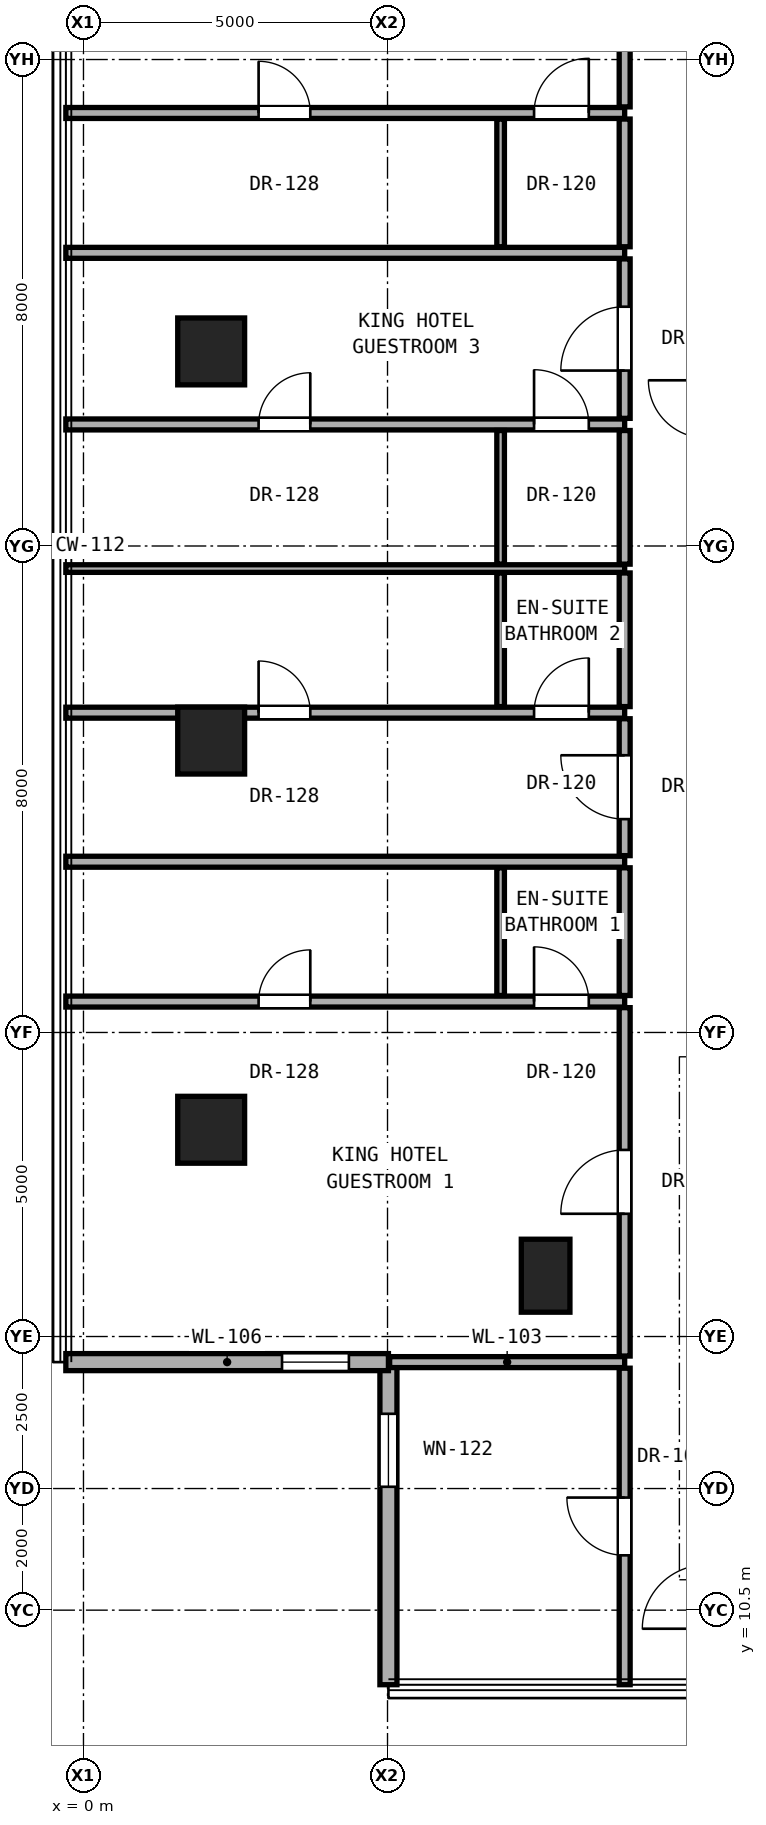
"""IFC4 building model, lengths in metres.
Left out: names, types, materials, properties, quantities, classifications, styles, units other than length and angle.
Written with IfcOpenShell. Run it as: python <this file> out.ifc"""

import sys

from ifc_helpers import new_model, si_unit, direction, frame, frame_2d, origin, origin_2d, place, context, subcontext, project, spatial, rectangle, hollow_rectangle, extrude, element, fill, save


model = new_model("IFC4")
c1 = context("Model", 3, precision=1e-05, world=origin(), true_north=direction((0.0, 1.0)))
c2 = subcontext(c1, "Body", "Model", "MODEL_VIEW")
j1 = project(units=[si_unit("LENGTHUNIT", "METRE"), si_unit("PLANEANGLEUNIT", "RADIAN")], contexts=[c1])
p1 = place(None, origin())
s1 = spatial("IfcSite", under=j1, at=p1, CompositionType="ELEMENT")
p2 = place(p1, origin())
s2 = spatial("IfcBuilding", under=s1, at=p2, CompositionType="ELEMENT")
p3 = place(p2, frame((0.0, 0.0, 95.0)))
s3 = spatial("IfcBuildingStorey", under=s2, at=p3, CompositionType="ELEMENT", Elevation=95.0)
for number, where, z_axis, x_axis in (
    (1, (2.1, 18.4, 0.0), (0.0, 0.0, 1.0), (1.0, 0.0, 0.0)),
    (2, (2.1, 24.8, 0.0), (0.0, 0.0, 1.0), (1.0, 0.0, 0.0)),
    (3, (2.1, 31.2, 0.0), (0.0, 0.0, 1.0), (1.0, 0.0, 0.0)),
):
    element("IfcColumn", number, at=place(p3, frame(where, z_axis=z_axis, x_axis=x_axis)), inside=s3, PredefinedType="COLUMN", context=c2, shape_type="SweptSolid", body=[
        extrude(hollow_rectangle(XDim=1.1, YDim=1.1, WallThickness=0.06, at=origin_2d()), origin(), (0.0, 0.0, 1.0), 3.3),
    ])
p4 = place(p3, frame((7.6, 16.0, 0.0), z_axis=(0.0, 0.0, 1.0), x_axis=(1.0, 0.0, 0.0)))
e4 = element("IfcColumn", 4, at=p4, inside=s3, PredefinedType="PILASTER", context=c2, shape_type="SweptSolid", body=[
    extrude(rectangle(XDim=0.8, YDim=1.2, at=origin_2d()), origin(), (0.0, 0.0, 1.0), 3.3),
])
p5 = place(p3, frame((5.015, 14.579, 0.0), z_axis=(0.0, 0.0, 1.0), x_axis=(0.0, -1.0, 0.0)))
e5 = element("IfcWall", 5, at=p5, inside=s3, PredefinedType="SOLIDWALL", context=c2, shape_type="SweptSolid", body=[
    extrude(rectangle(XDim=5.305, YDim=0.28, at=frame_2d((2.653, 0.0))), origin(), (0.0, 0.0, 1.0), 3.06),
])
p6 = place(p5, frame((0.85, 0.0, 0.81)))
e6 = element("IfcOpeningElement", 6, at=p6, cuts=e5, PredefinedType="OPENING", context=c2, shape_type="SweptSolid", body=[
    extrude(rectangle(XDim=1.2, YDim=2.1, at=frame_2d((0.6, 1.05))), frame((0.0, 0.15, 0.0), z_axis=(0.0, -1.0, 0.0), x_axis=(1.0, 0.0, 0.0)), (0.0, 0.0, 1.0), 0.3),
])
p7 = place(p3, frame((-0.29, 14.579, 0.0), z_axis=(0.0, 0.0, 1.0), x_axis=(1.0, 0.0, 0.0)))
e7 = element("IfcWall", 7, at=p7, inside=s3, PredefinedType="SOLIDWALL", context=c2, shape_type="SweptSolid", body=[
    extrude(rectangle(XDim=5.305, YDim=0.28, at=frame_2d((2.652, 0.0))), origin(), (0.0, 0.0, 1.0), 3.06),
])
p8 = place(p7, frame((3.555, 0.0, 0.85)))
e8 = element("IfcOpeningElement", 8, at=p8, cuts=e7, PredefinedType="OPENING", context=c2, shape_type="SweptSolid", body=[
    extrude(rectangle(XDim=1.1, YDim=2.0, at=frame_2d((0.55, 1.0))), frame((0.0, 0.15, 0.0), z_axis=(0.0, -1.0, 0.0), x_axis=(1.0, 0.0, 0.0)), (0.0, 0.0, 1.0), 0.3),
])
p9 = place(p3, frame((5.035, 14.579, 0.0), z_axis=(0.0, 0.0, 1.0), x_axis=(1.0, 0.0, 0.0)))
e9 = element("IfcWall", 9, at=p9, inside=s3, PredefinedType="PARTITIONING", context=c2, shape_type="SweptSolid", body=[
    extrude(rectangle(XDim=3.865, YDim=0.18, at=frame_2d((1.933, 0.0))), origin(), (0.0, 0.0, 1.0), 3.08),
])
p10 = place(p3, frame((-0.29, 20.508, 0.0), z_axis=(0.0, 0.0, 1.0), x_axis=(1.0, 0.0, 0.0)))
e10 = element("IfcWall", 10, at=p10, inside=s3, PredefinedType="PARTITIONING", context=c2, shape_type="SweptSolid", body=[
    extrude(rectangle(XDim=9.19, YDim=0.18, at=frame_2d((4.595, 0.0))), origin(), (0.0, 0.0, 1.0), 2.145),
])
p11 = place(p10, frame((3.17, 0.0, 0.0)))
e11 = element("IfcOpeningElement", 11, at=p11, cuts=e10, PredefinedType="OPENING", context=c2, shape_type="SweptSolid", body=[
    extrude(rectangle(XDim=0.85, YDim=2.01, at=frame_2d((0.425, 1.005))), frame((0.0, 0.1, 0.0), z_axis=(0.0, -1.0, 0.0), x_axis=(1.0, 0.0, 0.0)), (0.0, 0.0, 1.0), 0.2),
])
p12 = place(p10, frame((7.7, 0.0, 0.0)))
e12 = element("IfcOpeningElement", 12, at=p12, cuts=e10, PredefinedType="OPENING", context=c2, shape_type="SweptSolid", body=[
    extrude(rectangle(XDim=0.9, YDim=2.1, at=frame_2d((0.45, 1.05))), frame((0.0, 0.1, 0.0), z_axis=(0.0, -1.0, 0.0), x_axis=(1.0, 0.0, 0.0)), (0.0, 0.0, 1.0), 0.2),
])
p13 = place(p3, frame((-0.29, 22.808, 0.0), z_axis=(0.0, 0.0, 1.0), x_axis=(1.0, 0.0, 0.0)))
e13 = element("IfcWall", 13, at=p13, inside=s3, PredefinedType="PARTITIONING", context=c2, shape_type="SweptSolid", body=[
    extrude(rectangle(XDim=9.19, YDim=0.18, at=frame_2d((4.595, 0.0))), origin(), (0.0, 0.0, 1.0), 2.145),
])
p14 = place(p3, frame((-0.29, 25.259, 0.0), z_axis=(0.0, 0.0, 1.0), x_axis=(1.0, 0.0, 0.0)))
e14 = element("IfcWall", 14, at=p14, inside=s3, PredefinedType="PARTITIONING", context=c2, shape_type="SweptSolid", body=[
    extrude(rectangle(XDim=9.19, YDim=0.18, at=frame_2d((4.595, 0.0))), origin(), (0.0, 0.0, 1.0), 2.145),
])
p15 = place(p14, frame((3.17, 0.0, 0.0)))
e15 = element("IfcOpeningElement", 15, at=p15, cuts=e14, PredefinedType="OPENING", context=c2, shape_type="SweptSolid", body=[
    extrude(rectangle(XDim=0.85, YDim=2.01, at=frame_2d((0.425, 1.005))), frame((0.0, 0.1, 0.0), z_axis=(0.0, -1.0, 0.0), x_axis=(1.0, 0.0, 0.0)), (0.0, 0.0, 1.0), 0.2),
])
p16 = place(p14, frame((7.7, 0.0, 0.0)))
e16 = element("IfcOpeningElement", 16, at=p16, cuts=e14, PredefinedType="OPENING", context=c2, shape_type="SweptSolid", body=[
    extrude(rectangle(XDim=0.9, YDim=2.1, at=frame_2d((0.45, 1.05))), frame((0.0, 0.1, 0.0), z_axis=(0.0, -1.0, 0.0), x_axis=(1.0, 0.0, 0.0)), (0.0, 0.0, 1.0), 0.2),
])
p17 = place(p3, frame((-0.29, 27.629, 0.0), z_axis=(0.0, 0.0, 1.0), x_axis=(1.0, 0.0, 0.0)))
e17 = element("IfcWall", 17, at=p17, inside=s3, PredefinedType="PARTITIONING", context=c2, shape_type="SweptSolid", body=[
    extrude(rectangle(XDim=9.19, YDim=0.125, at=frame_2d((4.595, 0.0))), origin(), (0.0, 0.0, 1.0), 2.145),
])
p18 = place(p3, frame((-0.29, 29.999, 0.0), z_axis=(0.0, 0.0, 1.0), x_axis=(1.0, 0.0, 0.0)))
e18 = element("IfcWall", 18, at=p18, inside=s3, PredefinedType="PARTITIONING", context=c2, shape_type="SweptSolid", body=[
    extrude(rectangle(XDim=9.19, YDim=0.18, at=frame_2d((4.595, 0.0))), origin(), (0.0, 0.0, 1.0), 2.145),
])
p19 = place(p18, frame((3.17, 0.0, 0.0)))
e19 = element("IfcOpeningElement", 19, at=p19, cuts=e18, PredefinedType="OPENING", context=c2, shape_type="SweptSolid", body=[
    extrude(rectangle(XDim=0.85, YDim=2.01, at=frame_2d((0.425, 1.005))), frame((0.0, 0.1, 0.0), z_axis=(0.0, -1.0, 0.0), x_axis=(1.0, 0.0, 0.0)), (0.0, 0.0, 1.0), 0.2),
])
p20 = place(p18, frame((7.7, 0.0, 0.0)))
e20 = element("IfcOpeningElement", 20, at=p20, cuts=e18, PredefinedType="OPENING", context=c2, shape_type="SweptSolid", body=[
    extrude(rectangle(XDim=0.9, YDim=2.1, at=frame_2d((0.45, 1.05))), frame((0.0, 0.1, 0.0), z_axis=(0.0, -1.0, 0.0), x_axis=(1.0, 0.0, 0.0)), (0.0, 0.0, 1.0), 0.2),
])
p21 = place(p3, frame((-0.29, 32.821, 0.0), z_axis=(0.0, 0.0, 1.0), x_axis=(1.0, 0.0, 0.0)))
e21 = element("IfcWall", 21, at=p21, inside=s3, PredefinedType="PARTITIONING", context=c2, shape_type="SweptSolid", body=[
    extrude(rectangle(XDim=9.19, YDim=0.18, at=frame_2d((4.595, 0.0))), origin(), (0.0, 0.0, 1.0), 2.145),
])
p22 = place(p3, frame((-0.29, 35.121, 0.0), z_axis=(0.0, 0.0, 1.0), x_axis=(1.0, 0.0, 0.0)))
e22 = element("IfcWall", 22, at=p22, inside=s3, PredefinedType="PARTITIONING", context=c2, shape_type="SweptSolid", body=[
    extrude(rectangle(XDim=9.19, YDim=0.18, at=frame_2d((4.595, 0.0))), origin(), (0.0, 0.0, 1.0), 2.145),
])
p23 = place(p22, frame((3.17, 0.0, 0.0)))
e23 = element("IfcOpeningElement", 23, at=p23, cuts=e22, PredefinedType="OPENING", context=c2, shape_type="SweptSolid", body=[
    extrude(rectangle(XDim=0.85, YDim=2.01, at=frame_2d((0.425, 1.005))), frame((0.0, 0.1, 0.0), z_axis=(0.0, -1.0, 0.0), x_axis=(1.0, 0.0, 0.0)), (0.0, 0.0, 1.0), 0.2),
])
p24 = place(p22, frame((7.7, 0.0, 0.0)))
e24 = element("IfcOpeningElement", 24, at=p24, cuts=e22, PredefinedType="OPENING", context=c2, shape_type="SweptSolid", body=[
    extrude(rectangle(XDim=0.9, YDim=2.1, at=frame_2d((0.45, 1.05))), frame((0.0, 0.1, 0.0), z_axis=(0.0, -1.0, 0.0), x_axis=(1.0, 0.0, 0.0)), (0.0, 0.0, 1.0), 0.2),
])
p25 = place(p3, frame((6.86, 20.608, 0.0), z_axis=(0.0, 0.0, 1.0), x_axis=(0.0, 1.0, 0.0)))
e25 = element("IfcWall", 25, at=p25, inside=s3, PredefinedType="PARTITIONING", context=c2, shape_type="SweptSolid", body=[
    extrude(rectangle(XDim=2.1, YDim=0.125, at=frame_2d((1.05, 0.0))), origin(), (0.0, 0.0, 1.0), 3.08),
])
for number, where, z_axis, x_axis in (
    (26, (6.86, 25.359, 0.0), (0.0, 0.0, 1.0), (0.0, 1.0, 0.0)),
    (27, (6.86, 27.701, 0.0), (0.0, 0.0, 1.0), (0.0, 1.0, 0.0)),
):
    element("IfcWall", number, at=place(p3, frame(where, z_axis=z_axis, x_axis=x_axis)), inside=s3, PredefinedType="PARTITIONING", context=c2, shape_type="SweptSolid", body=[
        extrude(rectangle(XDim=2.198, YDim=0.125, at=frame_2d((1.099, 0.0))), origin(), (0.0, 0.0, 1.0), 3.08),
    ])
p26 = place(p3, frame((6.86, 32.921, 0.0), z_axis=(0.0, 0.0, 1.0), x_axis=(0.0, 1.0, 0.0)))
e28 = element("IfcWall", 28, at=p26, inside=s3, PredefinedType="PARTITIONING", context=c2, shape_type="SweptSolid", body=[
    extrude(rectangle(XDim=2.1, YDim=0.125, at=frame_2d((1.05, 0.0))), origin(), (0.0, 0.0, 1.0), 3.08),
])
p27 = place(p3, frame((8.9, 9.274, 0.0), z_axis=(0.0, 0.0, 1.0), x_axis=(0.0, 1.0, 0.0)))
e29 = element("IfcWall", 29, at=p27, inside=s3, PredefinedType="PARTITIONING", context=c2, shape_type="SweptSolid", body=[
    extrude(rectangle(XDim=5.205, YDim=0.18, at=frame_2d((2.603, 0.0))), origin(), (0.0, 0.0, 1.0), 3.08),
])
p28 = place(p27, frame((2.127, 0.0, 0.0)))
e30 = element("IfcOpeningElement", 30, at=p28, cuts=e29, PredefinedType="OPENING", context=c2, shape_type="SweptSolid", body=[
    extrude(rectangle(XDim=0.95, YDim=2.15, at=frame_2d((0.475, 1.075))), frame((0.0, 0.1, 0.0), z_axis=(0.0, -1.0, 0.0), x_axis=(1.0, 0.0, 0.0)), (0.0, 0.0, 1.0), 0.2),
])
p29 = place(p3, frame((8.9, 14.679, 0.0), z_axis=(0.0, 0.0, 1.0), x_axis=(0.0, 1.0, 0.0)))
e31 = element("IfcWall", 31, at=p29, inside=s3, PredefinedType="PARTITIONING", context=c2, shape_type="SweptSolid", body=[
    extrude(rectangle(XDim=5.729, YDim=0.18, at=frame_2d((2.865, 0.0))), origin(), (0.0, 0.0, 1.0), 2.456),
])
p30 = place(p29, frame((2.34, 0.0, 0.0)))
e32 = element("IfcOpeningElement", 32, at=p30, cuts=e31, PredefinedType="OPENING", context=c2, shape_type="SweptSolid", body=[
    extrude(rectangle(XDim=1.05, YDim=2.2, at=frame_2d((0.525, 1.1))), frame((0.0, 0.1, 0.0), z_axis=(0.0, -1.0, 0.0), x_axis=(1.0, 0.0, 0.0)), (0.0, 0.0, 1.0), 0.2),
])
p31 = place(p3, frame((8.9, 20.608, 0.0), z_axis=(0.0, 0.0, 1.0), x_axis=(0.0, 1.0, 0.0)))
e33 = element("IfcWall", 33, at=p31, inside=s3, PredefinedType="PARTITIONING", context=c2, shape_type="SweptSolid", body=[
    extrude(rectangle(XDim=2.1, YDim=0.18, at=frame_2d((1.05, 0.0))), origin(), (0.0, 0.0, 1.0), 3.08),
])
p32 = place(p3, frame((8.9, 22.908, 0.0), z_axis=(0.0, 0.0, 1.0), x_axis=(0.0, 1.0, 0.0)))
e34 = element("IfcWall", 34, at=p32, inside=s3, PredefinedType="PARTITIONING", context=c2, shape_type="SweptSolid", body=[
    extrude(rectangle(XDim=2.251, YDim=0.18, at=frame_2d((1.125, 0.0))), origin(), (0.0, 0.0, 1.0), 2.299),
])
p33 = place(p32, frame((0.601, 0.0, 0.0)))
e35 = element("IfcOpeningElement", 35, at=p33, cuts=e34, PredefinedType="OPENING", context=c2, shape_type="SweptSolid", body=[
    extrude(rectangle(XDim=1.05, YDim=2.2, at=frame_2d((0.525, 1.1))), frame((0.0, 0.1, 0.0), z_axis=(0.0, -1.0, 0.0), x_axis=(1.0, 0.0, 0.0)), (0.0, 0.0, 1.0), 0.2),
])
for number, where, z_axis, x_axis in (
    (36, (8.9, 25.359, 0.0), (0.0, 0.0, 1.0), (0.0, 1.0, 0.0)),
    (37, (8.9, 27.701, 0.0), (0.0, 0.0, 1.0), (0.0, 1.0, 0.0)),
):
    element("IfcWall", number, at=place(p3, frame(where, z_axis=z_axis, x_axis=x_axis)), inside=s3, PredefinedType="PARTITIONING", context=c2, shape_type="SweptSolid", body=[
        extrude(rectangle(XDim=2.198, YDim=0.18, at=frame_2d((1.099, 0.0))), origin(), (0.0, 0.0, 1.0), 3.08),
    ])
p34 = place(p3, frame((8.9, 30.099, 0.0), z_axis=(0.0, 0.0, 1.0), x_axis=(0.0, 1.0, 0.0)))
e38 = element("IfcWall", 38, at=p34, inside=s3, PredefinedType="PARTITIONING", context=c2, shape_type="SweptSolid", body=[
    extrude(rectangle(XDim=2.622, YDim=0.18, at=frame_2d((1.311, 0.0))), origin(), (0.0, 0.0, 1.0), 2.299),
])
p35 = place(p34, frame((0.786, 0.0, 0.0)))
e39 = element("IfcOpeningElement", 39, at=p35, cuts=e38, PredefinedType="OPENING", context=c2, shape_type="SweptSolid", body=[
    extrude(rectangle(XDim=1.05, YDim=2.2, at=frame_2d((0.525, 1.1))), frame((0.0, 0.1, 0.0), z_axis=(0.0, -1.0, 0.0), x_axis=(1.0, 0.0, 0.0)), (0.0, 0.0, 1.0), 0.2),
])
p36 = place(p3, frame((8.9, 32.921, 0.0), z_axis=(0.0, 0.0, 1.0), x_axis=(0.0, 1.0, 0.0)))
e40 = element("IfcWall", 40, at=p36, inside=s3, PredefinedType="PARTITIONING", context=c2, shape_type="SweptSolid", body=[
    extrude(rectangle(XDim=2.1, YDim=0.18, at=frame_2d((1.05, 0.0))), origin(), (0.0, 0.0, 1.0), 3.08),
])
p37 = place(p3, frame((8.9, 35.221, 0.0), z_axis=(0.0, 0.0, 1.0), x_axis=(0.0, 1.0, 0.0)))
e41 = element("IfcWall", 41, at=p37, inside=s3, PredefinedType="PARTITIONING", context=c2, shape_type="SweptSolid", body=[
    extrude(rectangle(XDim=6.1, YDim=0.18, at=frame_2d((3.05, 0.0))), origin(), (0.0, 0.0, 1.0), 2.456),
])
p38 = place(p37, frame((2.525, 0.0, 0.0)))
e42 = element("IfcOpeningElement", 42, at=p38, cuts=e41, PredefinedType="OPENING", context=c2, shape_type="SweptSolid", body=[
    extrude(rectangle(XDim=1.05, YDim=2.2, at=frame_2d((0.525, 1.1))), frame((0.0, 0.1, 0.0), z_axis=(0.0, -1.0, 0.0), x_axis=(1.0, 0.0, 0.0)), (0.0, 0.0, 1.0), 0.2),
])
p39 = place(p6, origin())
e43 = element("IfcWindow", 43, at=p39, inside=s3, PartitioningType="SINGLE_PANEL", PredefinedType="WINDOW", context=c2, shape_type="SweptSolid", body=[
    extrude(rectangle(XDim=1.2, YDim=2.1, at=frame_2d((0.6, 1.05))), frame((0.0, 0.03, 0.0), z_axis=(0.0, -1.0, 0.0), x_axis=(1.0, 0.0, 0.0)), (0.0, 0.0, 1.0), 0.06),
])
fill(e6, e43)
p40 = place(p8, origin())
e44 = element("IfcWindow", 44, at=p40, inside=s3, PartitioningType="SINGLE_PANEL", PredefinedType="WINDOW", context=c2, shape_type="SweptSolid", body=[
    extrude(rectangle(XDim=1.1, YDim=2.0, at=frame_2d((0.55, 1.0))), frame((0.0, 0.03, 0.0), z_axis=(0.0, -1.0, 0.0), x_axis=(1.0, 0.0, 0.0)), (0.0, 0.0, 1.0), 0.06),
])
fill(e8, e44)
p41 = place(p30, origin())
e45 = element("IfcDoor", 45, at=p41, inside=s3, OperationType="SINGLE_SWING_LEFT", PredefinedType="DOOR", context=c2, shape_type="SweptSolid", body=[
    extrude(rectangle(XDim=1.05, YDim=2.2, at=frame_2d((0.525, 1.1))), frame((0.0, 0.025, 0.0), z_axis=(0.0, -1.0, 0.0), x_axis=(1.0, 0.0, 0.0)), (0.0, 0.0, 1.0), 0.05),
])
fill(e32, e45)
p42 = place(p11, origin())
e46 = element("IfcDoor", 46, at=p42, inside=s3, OperationType="SINGLE_SWING_RIGHT", PredefinedType="DOOR", context=c2, shape_type="SweptSolid", body=[
    extrude(rectangle(XDim=0.85, YDim=2.01, at=frame_2d((0.425, 1.005))), frame((0.0, 0.025, 0.0), z_axis=(0.0, -1.0, 0.0), x_axis=(1.0, 0.0, 0.0)), (0.0, 0.0, 1.0), 0.05),
])
fill(e11, e46)
p43 = place(p12, origin())
e47 = element("IfcDoor", 47, at=p43, inside=s3, OperationType="SINGLE_SWING_LEFT", PredefinedType="DOOR", context=c2, shape_type="SweptSolid", body=[
    extrude(rectangle(XDim=0.9, YDim=2.1, at=frame_2d((0.45, 1.05))), frame((0.0, 0.025, 0.0), z_axis=(0.0, -1.0, 0.0), x_axis=(1.0, 0.0, 0.0)), (0.0, 0.0, 1.0), 0.05),
])
fill(e12, e47)
p44 = place(p33, origin())
e48 = element("IfcDoor", 48, at=p44, inside=s3, OperationType="SINGLE_SWING_RIGHT", PredefinedType="DOOR", context=c2, shape_type="SweptSolid", body=[
    extrude(rectangle(XDim=1.05, YDim=2.2, at=frame_2d((0.525, 1.1))), frame((0.0, 0.025, 0.0), z_axis=(0.0, -1.0, 0.0), x_axis=(1.0, 0.0, 0.0)), (0.0, 0.0, 1.0), 0.05),
])
fill(e35, e48)
p45 = place(p15, origin())
e49 = element("IfcDoor", 49, at=p45, inside=s3, OperationType="SINGLE_SWING_LEFT", PredefinedType="DOOR", context=c2, shape_type="SweptSolid", body=[
    extrude(rectangle(XDim=0.85, YDim=2.01, at=frame_2d((0.425, 1.005))), frame((0.0, 0.025, 0.0), z_axis=(0.0, -1.0, 0.0), x_axis=(1.0, 0.0, 0.0)), (0.0, 0.0, 1.0), 0.05),
])
fill(e15, e49)
p46 = place(p16, origin())
e50 = element("IfcDoor", 50, at=p46, inside=s3, OperationType="SINGLE_SWING_RIGHT", PredefinedType="DOOR", context=c2, shape_type="SweptSolid", body=[
    extrude(rectangle(XDim=0.9, YDim=2.1, at=frame_2d((0.45, 1.05))), frame((0.0, 0.025, 0.0), z_axis=(0.0, -1.0, 0.0), x_axis=(1.0, 0.0, 0.0)), (0.0, 0.0, 1.0), 0.05),
])
fill(e16, e50)
p47 = place(p35, origin())
e51 = element("IfcDoor", 51, at=p47, inside=s3, OperationType="SINGLE_SWING_LEFT", PredefinedType="DOOR", context=c2, shape_type="SweptSolid", body=[
    extrude(rectangle(XDim=1.05, YDim=2.2, at=frame_2d((0.525, 1.1))), frame((0.0, 0.025, 0.0), z_axis=(0.0, -1.0, 0.0), x_axis=(1.0, 0.0, 0.0)), (0.0, 0.0, 1.0), 0.05),
])
fill(e39, e51)
p48 = place(p19, origin())
e52 = element("IfcDoor", 52, at=p48, inside=s3, OperationType="SINGLE_SWING_RIGHT", PredefinedType="DOOR", context=c2, shape_type="SweptSolid", body=[
    extrude(rectangle(XDim=0.85, YDim=2.01, at=frame_2d((0.425, 1.005))), frame((0.0, 0.025, 0.0), z_axis=(0.0, -1.0, 0.0), x_axis=(1.0, 0.0, 0.0)), (0.0, 0.0, 1.0), 0.05),
])
fill(e19, e52)
p49 = place(p20, origin())
e53 = element("IfcDoor", 53, at=p49, inside=s3, OperationType="SINGLE_SWING_LEFT", PredefinedType="DOOR", context=c2, shape_type="SweptSolid", body=[
    extrude(rectangle(XDim=0.9, YDim=2.1, at=frame_2d((0.45, 1.05))), frame((0.0, 0.025, 0.0), z_axis=(0.0, -1.0, 0.0), x_axis=(1.0, 0.0, 0.0)), (0.0, 0.0, 1.0), 0.05),
])
fill(e20, e53)
p50 = place(p23, origin())
e54 = element("IfcDoor", 54, at=p50, inside=s3, OperationType="SINGLE_SWING_LEFT", PredefinedType="DOOR", context=c2, shape_type="SweptSolid", body=[
    extrude(rectangle(XDim=0.85, YDim=2.01, at=frame_2d((0.425, 1.005))), frame((0.0, 0.025, 0.0), z_axis=(0.0, -1.0, 0.0), x_axis=(1.0, 0.0, 0.0)), (0.0, 0.0, 1.0), 0.05),
])
fill(e23, e54)
p51 = place(p24, origin())
e55 = element("IfcDoor", 55, at=p51, inside=s3, OperationType="SINGLE_SWING_RIGHT", PredefinedType="DOOR", context=c2, shape_type="SweptSolid", body=[
    extrude(rectangle(XDim=0.9, YDim=2.1, at=frame_2d((0.45, 1.05))), frame((0.0, 0.025, 0.0), z_axis=(0.0, -1.0, 0.0), x_axis=(1.0, 0.0, 0.0)), (0.0, 0.0, 1.0), 0.05),
])
fill(e24, e55)
p52 = place(p28, origin())
e56 = element("IfcDoor", 56, at=p52, inside=s3, OperationType="SINGLE_SWING_RIGHT", PredefinedType="DOOR", context=c2, shape_type="SweptSolid", body=[
    extrude(rectangle(XDim=0.95, YDim=2.15, at=frame_2d((0.475, 1.075))), frame((0.0, 0.025, 0.0), z_axis=(0.0, -1.0, 0.0), x_axis=(1.0, 0.0, 0.0)), (0.0, 0.0, 1.0), 0.05),
])
fill(e30, e56)
save(model, sys.argv[1])
